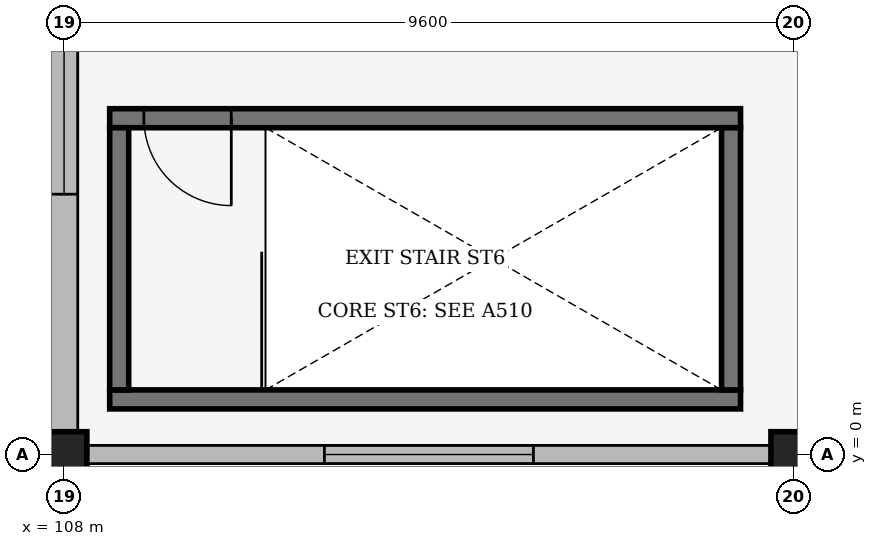
"""IFC4 building model, lengths in metres.
Left out: names, types, materials, properties, quantities, classifications, styles, units other than length and angle.
Written with IfcOpenShell. Run it as: python <this file> out.ifc"""

import sys

from ifc_helpers import new_model, si_unit, direction, frame, frame_2d, origin, origin_2d, place, context, subcontext, project, spatial, rectangle, extrude, element, fill, save


model = new_model("IFC4")
c1 = context("Model", 3, precision=1e-05, world=origin(), true_north=direction((0.0, 1.0)))
c2 = subcontext(c1, "Body", "Model", "MODEL_VIEW")
j1 = project(units=[si_unit("LENGTHUNIT", "METRE"), si_unit("PLANEANGLEUNIT", "RADIAN")], contexts=[c1])
p1 = place(None, origin())
s1 = spatial("IfcSite", under=j1, at=p1, CompositionType="ELEMENT")
p2 = place(p1, origin())
s2 = spatial("IfcBuilding", under=s1, at=p2, CompositionType="ELEMENT")
p3 = place(p2, frame((0.0, 0.0, 15.3)))
s3 = spatial("IfcBuildingStorey", under=s2, at=p3, CompositionType="ELEMENT", Elevation=15.3)
for number, where, z_axis, x_axis in (
    (1, (108.0, 0.0, 0.0), (0.0, 0.0, 1.0), (1.0, 0.0, 0.0)),
    (2, (117.6, 0.0, 0.0), (0.0, 0.0, 1.0), (1.0, 0.0, 0.0)),
):
    element("IfcColumn", number, at=place(p3, frame(where, z_axis=z_axis, x_axis=x_axis)), inside=s3, PredefinedType="COLUMN", context=c2, shape_type="SweptSolid", body=[
        extrude(rectangle(XDim=0.6, YDim=0.6, at=origin_2d()), origin(), (0.0, 0.0, 1.0), 4.5),
    ])
p4 = place(p3, frame((108.0, 9.292, 0.0), z_axis=(0.0, 0.0, 1.0), x_axis=(0.0, -1.0, 0.0)))
e3 = element("IfcWall", 3, at=p4, inside=s3, PredefinedType="SOLIDWALL", context=c2, shape_type="SweptSolid", body=[
    extrude(rectangle(XDim=8.984, YDim=0.36, at=frame_2d((4.492, 0.0))), origin(), (0.0, 0.0, 1.0), 4.12),
])
p5 = place(p4, frame((3.117, 0.0, 0.95)))
e4 = element("IfcOpeningElement", 4, at=p5, cuts=e3, PredefinedType="OPENING", context=c2, shape_type="SweptSolid", body=[
    extrude(rectangle(XDim=2.75, YDim=1.5, at=frame_2d((1.375, 0.75))), frame((0.0, 0.19, 0.0), z_axis=(0.0, -1.0, 0.0), x_axis=(1.0, 0.0, 0.0)), (0.0, 0.0, 1.0), 0.38),
])
p6 = place(p3, frame((108.308, 0.0, 0.0), z_axis=(0.0, 0.0, 1.0), x_axis=(1.0, 0.0, 0.0)))
e5 = element("IfcWall", 5, at=p6, inside=s3, PredefinedType="SOLIDWALL", context=c2, shape_type="SweptSolid", body=[
    extrude(rectangle(XDim=8.984, YDim=0.24, at=frame_2d((4.492, 0.0))), origin(), (0.0, 0.0, 1.0), 4.12),
])
p7 = place(p6, frame((3.117, 0.0, 0.95)))
e6 = element("IfcOpeningElement", 6, at=p7, cuts=e5, PredefinedType="OPENING", context=c2, shape_type="SweptSolid", body=[
    extrude(rectangle(XDim=2.75, YDim=1.8, at=frame_2d((1.375, 0.9))), frame((0.0, 0.13, 0.0), z_axis=(0.0, -1.0, 0.0), x_axis=(1.0, 0.0, 0.0)), (0.0, 0.0, 1.0), 0.26),
])
p8 = place(p3, frame((108.6, 0.725, 0.0), z_axis=(0.0, 0.0, 1.0), x_axis=(1.0, 0.0, 0.0)))
e7 = element("IfcWall", 7, at=p8, inside=s3, PredefinedType="SHEAR", context=c2, shape_type="SweptSolid", body=[
    extrude(rectangle(XDim=8.3, YDim=0.25, at=frame_2d((4.15, 0.0))), origin(), (0.0, 0.0, 1.0), 4.5),
])
p9 = place(p3, frame((116.9, 4.425, 0.0), z_axis=(0.0, 0.0, 1.0), x_axis=(-1.0, 0.0, 0.0)))
e8 = element("IfcWall", 8, at=p9, inside=s3, PredefinedType="SHEAR", context=c2, shape_type="SweptSolid", body=[
    extrude(rectangle(XDim=8.3, YDim=0.25, at=frame_2d((4.15, 0.0))), origin(), (0.0, 0.0, 1.0), 4.5),
])
p10 = place(p9, frame((7.85, 0.0, 0.0), z_axis=(0.0, 0.0, 1.0), x_axis=(-1.0, 0.0, 0.0)))
e9 = element("IfcOpeningElement", 9, at=p10, cuts=e8, PredefinedType="OPENING", context=c2, shape_type="SweptSolid", body=[
    extrude(rectangle(XDim=1.15, YDim=2.2, at=frame_2d((0.575, 1.1))), frame((0.0, 0.135, 0.0), z_axis=(0.0, -1.0, 0.0), x_axis=(1.0, 0.0, 0.0)), (0.0, 0.0, 1.0), 0.27),
])
for number, where, z_axis, x_axis in (
    (10, (108.725, 4.3, 0.0), (0.0, 0.0, 1.0), (0.0, -1.0, 0.0)),
    (11, (116.775, 0.85, 0.0), (0.0, 0.0, 1.0), (0.0, 1.0, 0.0)),
):
    element("IfcWall", number, at=place(p3, frame(where, z_axis=z_axis, x_axis=x_axis)), inside=s3, PredefinedType="SHEAR", context=c2, shape_type="SweptSolid", body=[
        extrude(rectangle(XDim=3.45, YDim=0.25, at=frame_2d((1.725, 0.0))), origin(), (0.0, 0.0, 1.0), 4.5),
    ])
p11 = place(p5, origin())
e12 = element("IfcWindow", 12, at=p11, inside=s3, PartitioningType="SINGLE_PANEL", PredefinedType="WINDOW", context=c2, shape_type="SweptSolid", body=[
    extrude(rectangle(XDim=2.75, YDim=1.5, at=frame_2d((1.375, 0.75))), frame((0.0, 0.03, 0.0), z_axis=(0.0, -1.0, 0.0), x_axis=(1.0, 0.0, 0.0)), (0.0, 0.0, 1.0), 0.06),
])
fill(e4, e12)
p12 = place(p7, origin())
e13 = element("IfcWindow", 13, at=p12, inside=s3, PartitioningType="SINGLE_PANEL", PredefinedType="WINDOW", context=c2, shape_type="SweptSolid", body=[
    extrude(rectangle(XDim=2.75, YDim=1.8, at=frame_2d((1.375, 0.9))), frame((0.0, 0.03, 0.0), z_axis=(0.0, -1.0, 0.0), x_axis=(1.0, 0.0, 0.0)), (0.0, 0.0, 1.0), 0.06),
])
fill(e6, e13)
p13 = place(p10, origin())
e14 = element("IfcDoor", 14, at=p13, inside=s3, OperationType="SINGLE_SWING_RIGHT", PredefinedType="DOOR", context=c2, shape_type="SweptSolid", body=[
    extrude(rectangle(XDim=1.15, YDim=2.2, at=frame_2d((0.575, 1.1))), frame((0.0, 0.025, 0.0), z_axis=(0.0, -1.0, 0.0), x_axis=(1.0, 0.0, 0.0)), (0.0, 0.0, 1.0), 0.05),
])
fill(e9, e14)
save(model, sys.argv[1])
